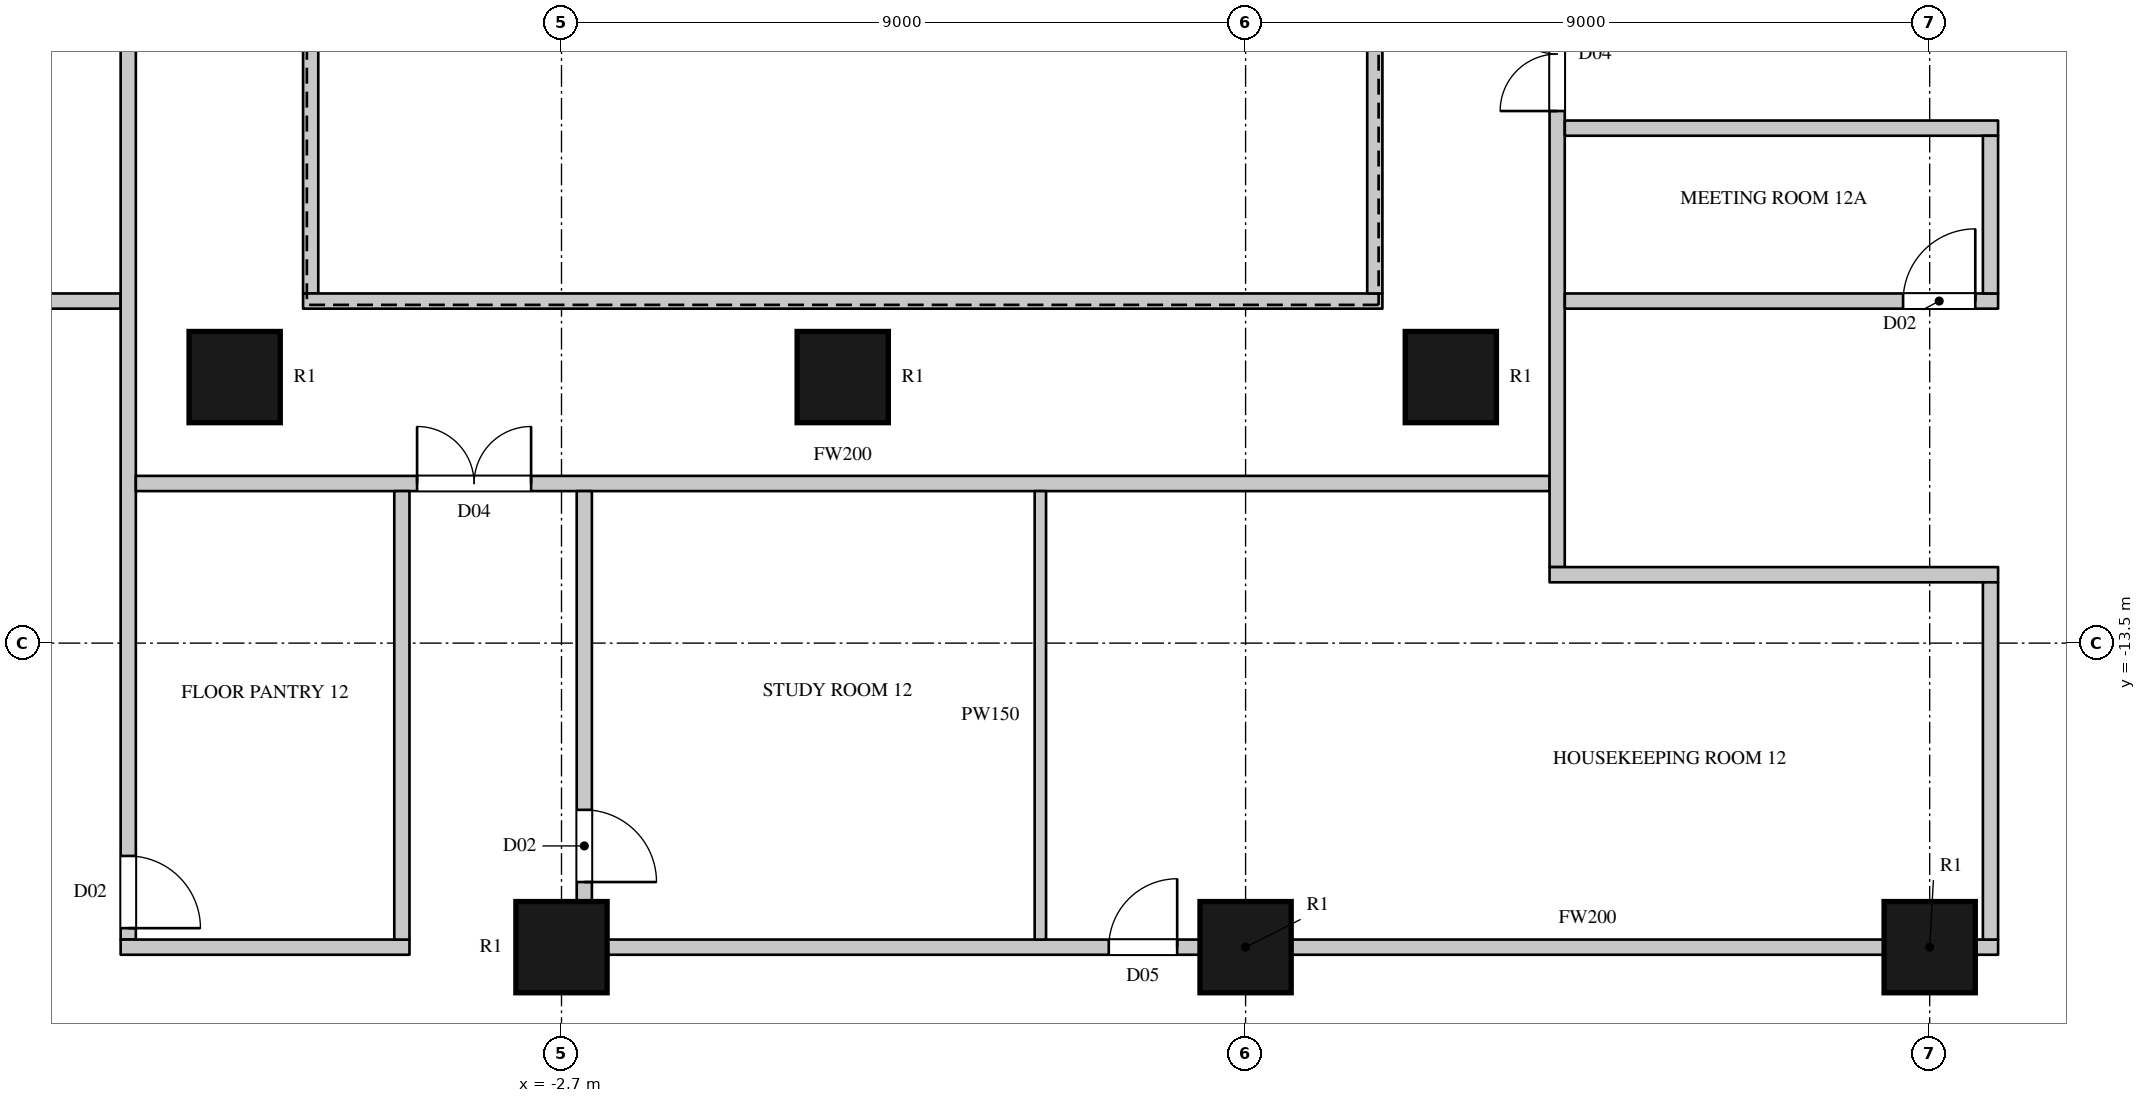
"""IFC4 building model, lengths in metres.
Left out: names, types, materials, properties, quantities, classifications, styles, units other than length and angle.
Written with IfcOpenShell. Run it as: python <this file> out.ifc"""

import sys

from ifc_helpers import new_model, si_unit, direction, frame, frame_2d, origin, origin_2d, place, context, subcontext, project, spatial, rectangle, circle, extrude, element, fill, save


model = new_model("IFC4")
c1 = context("Model", 3, precision=1e-05, world=origin(), true_north=direction((0.0, 1.0)))
c2 = subcontext(c1, "Body", "Model", "MODEL_VIEW")
j1 = project(units=[si_unit("LENGTHUNIT", "METRE"), si_unit("PLANEANGLEUNIT", "RADIAN")], contexts=[c1])
p1 = place(None, origin())
s1 = spatial("IfcSite", under=j1, at=p1, CompositionType="ELEMENT")
p2 = place(p1, origin())
s2 = spatial("IfcBuilding", under=s1, at=p2, CompositionType="ELEMENT")
p3 = place(p2, frame((0.0, 0.0, 73.5)))
s3 = spatial("IfcBuildingStorey", under=s2, at=p3, CompositionType="ELEMENT", Elevation=73.5)
for number, where, z_axis, x_axis in (
    (1, (-2.7, -17.5, 0.0), (0.0, 0.0, 1.0), (1.0, 0.0, 0.0)),
    (2, (6.3, -17.5, 0.0), (0.0, 0.0, 1.0), (1.0, 0.0, 0.0)),
    (3, (15.3, -17.5, 0.0), (0.0, 0.0, 1.0), (1.0, 0.0, 0.0)),
    (4, (-7.0, -10.0, 0.0), (0.0, 0.0, 1.0), (1.0, 0.0, 0.0)),
    (5, (1.0, -10.0, 0.0), (0.0, 0.0, 1.0), (1.0, 0.0, 0.0)),
    (6, (9.0, -10.0, 0.0), (0.0, 0.0, 1.0), (1.0, 0.0, 0.0)),
):
    element("IfcColumn", number, at=place(p3, frame(where, z_axis=z_axis, x_axis=x_axis)), inside=s3, PredefinedType="COLUMN", context=c2, shape_type="SweptSolid", body=[
        extrude(circle(Radius=0.6, at=origin_2d()), origin(), (0.0, 0.0, 1.0), 3.6),
    ])
p4 = place(p3, frame((-13.97, -9.0, 0.0), z_axis=(0.0, 0.0, 1.0), x_axis=(1.0, 0.0, 0.0)))
e7 = element("IfcWall", 7, at=p4, inside=s3, PredefinedType="PARTITIONING", context=c2, shape_type="SweptSolid", body=[
    extrude(rectangle(XDim=5.47, YDim=0.2, at=frame_2d((2.735, 0.0))), origin(), (0.0, 0.0, 1.0), 3.3),
])
p5 = place(p4, frame((0.4, 0.0, 0.0)))
e8 = element("IfcOpeningElement", 8, at=p5, cuts=e7, PredefinedType="OPENING", context=c2, shape_type="SweptSolid", body=[
    extrude(rectangle(XDim=1.5, YDim=2.2, at=frame_2d((0.75, 1.1))), frame((0.0, 0.11, 0.0), z_axis=(0.0, -1.0, 0.0), x_axis=(1.0, 0.0, 0.0)), (0.0, 0.0, 1.0), 0.22),
])
p6 = place(p4, frame((2.05, 0.0, 0.0)))
e9 = element("IfcOpeningElement", 9, at=p6, cuts=e7, PredefinedType="OPENING", context=c2, shape_type="SweptSolid", body=[
    extrude(rectangle(XDim=1.5, YDim=2.2, at=frame_2d((0.75, 1.1))), frame((0.0, 0.11, 0.0), z_axis=(0.0, -1.0, 0.0), x_axis=(1.0, 0.0, 0.0)), (0.0, 0.0, 1.0), 0.22),
])
p7 = place(p3, frame((-8.4, -17.4, 0.0), z_axis=(0.0, 0.0, 1.0), x_axis=(0.0, 1.0, 0.0)))
e10 = element("IfcWall", 10, at=p7, inside=s3, PredefinedType="PARTITIONING", context=c2, shape_type="SweptSolid", body=[
    extrude(rectangle(XDim=34.8, YDim=0.2, at=frame_2d((17.4, 0.0))), origin(), (0.0, 0.0, 1.0), 3.3),
])
p8 = place(p7, frame((21.15, 0.0, 0.0)))
e11 = element("IfcOpeningElement", 11, at=p8, cuts=e10, PredefinedType="OPENING", context=c2, shape_type="SweptSolid", body=[
    extrude(rectangle(XDim=1.5, YDim=2.2, at=frame_2d((0.75, 1.1))), frame((0.0, 0.11, 0.0), z_axis=(0.0, -1.0, 0.0), x_axis=(1.0, 0.0, 0.0)), (0.0, 0.0, 1.0), 0.22),
])
p9 = place(p7, frame((33.75, 0.0, 0.0)))
e12 = element("IfcOpeningElement", 12, at=p9, cuts=e10, PredefinedType="OPENING", context=c2, shape_type="SweptSolid", body=[
    extrude(rectangle(XDim=0.9, YDim=2.2, at=frame_2d((0.45, 1.1))), frame((0.0, 0.11, 0.0), z_axis=(0.0, -1.0, 0.0), x_axis=(1.0, 0.0, 0.0)), (0.0, 0.0, 1.0), 0.22),
])
p10 = place(p7, frame((0.15, 0.0, 0.0)))
e13 = element("IfcOpeningElement", 13, at=p10, cuts=e10, PredefinedType="OPENING", context=c2, shape_type="SweptSolid", body=[
    extrude(rectangle(XDim=0.95, YDim=2.2, at=frame_2d((0.475, 1.1))), frame((0.0, 0.11, 0.0), z_axis=(0.0, -1.0, 0.0), x_axis=(1.0, 0.0, 0.0)), (0.0, 0.0, 1.0), 0.22),
])
p11 = place(p3, frame((-8.5, -17.5, 0.0), z_axis=(0.0, 0.0, 1.0), x_axis=(1.0, 0.0, 0.0)))
e14 = element("IfcWall", 14, at=p11, inside=s3, PredefinedType="PARTITIONING", context=c2, shape_type="SweptSolid", body=[
    extrude(rectangle(XDim=3.8, YDim=0.2, at=frame_2d((1.9, 0.0))), origin(), (0.0, 0.0, 1.0), 2.75),
])
p12 = place(p3, frame((-8.3, -11.4, 0.0), z_axis=(0.0, 0.0, 1.0), x_axis=(1.0, 0.0, 0.0)))
e15 = element("IfcWall", 15, at=p12, inside=s3, PredefinedType="PARTITIONING", context=c2, shape_type="SweptSolid", body=[
    extrude(rectangle(XDim=18.6, YDim=0.2, at=frame_2d((9.3, 0.0))), origin(), (0.0, 0.0, 1.0), 3.3),
])
p13 = place(p12, frame((3.7, 0.0, 0.0)))
e16 = element("IfcOpeningElement", 16, at=p13, cuts=e15, PredefinedType="OPENING", context=c2, shape_type="SweptSolid", body=[
    extrude(rectangle(XDim=1.5, YDim=2.2, at=frame_2d((0.75, 1.1))), frame((0.0, 0.11, 0.0), z_axis=(0.0, -1.0, 0.0), x_axis=(1.0, 0.0, 0.0)), (0.0, 0.0, 1.0), 0.22),
])
p14 = place(p3, frame((-6.0, -8.9, 0.0), z_axis=(0.0, 0.0, 1.0), x_axis=(0.0, 1.0, 0.0)))
e17 = element("IfcWall", 17, at=p14, inside=s3, PredefinedType="PARTITIONING", context=c2, shape_type="SweptSolid", body=[
    extrude(rectangle(XDim=17.8, YDim=0.2, at=frame_2d((8.9, 0.0))), origin(), (0.0, 0.0, 1.0), 3.3),
])
p15 = place(p3, frame((-6.1, -9.0, 0.0), z_axis=(0.0, 0.0, 1.0), x_axis=(1.0, 0.0, 0.0)))
e18 = element("IfcWall", 18, at=p15, inside=s3, PredefinedType="PARTITIONING", context=c2, shape_type="SweptSolid", body=[
    extrude(rectangle(XDim=14.2, YDim=0.2, at=frame_2d((7.1, 0.0))), origin(), (0.0, 0.0, 1.0), 3.3),
])
p16 = place(p3, frame((-4.8, -17.4, 0.0), z_axis=(0.0, 0.0, 1.0), x_axis=(0.0, 1.0, 0.0)))
e19 = element("IfcWall", 19, at=p16, inside=s3, PredefinedType="PARTITIONING", context=c2, shape_type="SweptSolid", body=[
    extrude(rectangle(XDim=5.9, YDim=0.2, at=frame_2d((2.95, 0.0))), origin(), (0.0, 0.0, 1.0), 3.3),
])
p17 = place(p3, frame((-2.4, -16.943, 0.0), z_axis=(0.0, 0.0, 1.0), x_axis=(0.0, 1.0, 0.0)))
e20 = element("IfcWall", 20, at=p17, inside=s3, PredefinedType="PARTITIONING", context=c2, shape_type="SweptSolid", body=[
    extrude(rectangle(XDim=5.443, YDim=0.2, at=frame_2d((2.722, 0.0))), origin(), (0.0, 0.0, 1.0), 3.3),
])
p18 = place(p17, frame((0.3, 0.0, 0.0)))
e21 = element("IfcOpeningElement", 21, at=p18, cuts=e20, PredefinedType="OPENING", context=c2, shape_type="SweptSolid", body=[
    extrude(rectangle(XDim=0.95, YDim=2.2, at=frame_2d((0.475, 1.1))), frame((0.0, 0.11, 0.0), z_axis=(0.0, -1.0, 0.0), x_axis=(1.0, 0.0, 0.0)), (0.0, 0.0, 1.0), 0.22),
])
p19 = place(p3, frame((-2.1, -17.5, 0.0), z_axis=(0.0, 0.0, 1.0), x_axis=(1.0, 0.0, 0.0)))
e22 = element("IfcWall", 22, at=p19, inside=s3, PredefinedType="PARTITIONING", context=c2, shape_type="SweptSolid", body=[
    extrude(rectangle(XDim=7.8, YDim=0.2, at=frame_2d((3.9, 0.0))), origin(), (0.0, 0.0, 1.0), 2.75),
])
p20 = place(p19, frame((6.6, 0.0, 0.0)))
e23 = element("IfcOpeningElement", 23, at=p20, cuts=e22, PredefinedType="OPENING", context=c2, shape_type="SweptSolid", body=[
    extrude(rectangle(XDim=0.9, YDim=2.2, at=frame_2d((0.45, 1.1))), frame((0.0, 0.11, 0.0), z_axis=(0.0, -1.0, 0.0), x_axis=(1.0, 0.0, 0.0)), (0.0, 0.0, 1.0), 0.22),
])
p21 = place(p3, frame((6.9, -17.5, 0.0), z_axis=(0.0, 0.0, 1.0), x_axis=(1.0, 0.0, 0.0)))
e24 = element("IfcWall", 24, at=p21, inside=s3, PredefinedType="PARTITIONING", context=c2, shape_type="SweptSolid", body=[
    extrude(rectangle(XDim=7.8, YDim=0.2, at=frame_2d((3.9, 0.0))), origin(), (0.0, 0.0, 1.0), 2.75),
])
p22 = place(p3, frame((15.9, -17.5, 0.0), z_axis=(0.0, 0.0, 1.0), x_axis=(1.0, 0.0, 0.0)))
e25 = element("IfcWall", 25, at=p22, inside=s3, PredefinedType="PARTITIONING", context=c2, shape_type="SweptSolid", body=[
    extrude(rectangle(XDim=0.3, YDim=0.2, at=frame_2d((0.15, 0.0))), origin(), (0.0, 0.0, 1.0), 3.3),
])
p23 = place(p3, frame((8.0, -8.9, 0.0), z_axis=(0.0, 0.0, 1.0), x_axis=(0.0, 1.0, 0.0)))
e26 = element("IfcWall", 26, at=p23, inside=s3, PredefinedType="PARTITIONING", context=c2, shape_type="SweptSolid", body=[
    extrude(rectangle(XDim=17.8, YDim=0.2, at=frame_2d((8.9, 0.0))), origin(), (0.0, 0.0, 1.0), 3.3),
])
p24 = place(p3, frame((10.399, -12.5, 0.0), z_axis=(0.0, 0.0, 1.0), x_axis=(0.0, 1.0, 0.0)))
e27 = element("IfcWall", 27, at=p24, inside=s3, PredefinedType="PARTITIONING", context=c2, shape_type="SweptSolid", body=[
    extrude(rectangle(XDim=23.8, YDim=0.2, at=frame_2d((11.9, 0.0))), origin(), (0.0, 0.0, 1.0), 3.3),
])
p25 = place(p24, frame((6.0, 0.0, 0.0)))
e28 = element("IfcOpeningElement", 28, at=p25, cuts=e27, PredefinedType="OPENING", context=c2, shape_type="SweptSolid", body=[
    extrude(rectangle(XDim=1.5, YDim=2.2, at=frame_2d((0.75, 1.1))), frame((0.0, 0.11, 0.0), z_axis=(0.0, -1.0, 0.0), x_axis=(1.0, 0.0, 0.0)), (0.0, 0.0, 1.0), 0.22),
])
p26 = place(p24, frame((17.5, 0.0, 0.0)))
e29 = element("IfcOpeningElement", 29, at=p26, cuts=e27, PredefinedType="OPENING", context=c2, shape_type="SweptSolid", body=[
    extrude(rectangle(XDim=1.5, YDim=2.2, at=frame_2d((0.75, 1.1))), frame((0.0, 0.11, 0.0), z_axis=(0.0, -1.0, 0.0), x_axis=(1.0, 0.0, 0.0)), (0.0, 0.0, 1.0), 0.22),
])
p27 = place(p24, frame((7.7, 0.0, 0.0)))
e30 = element("IfcOpeningElement", 30, at=p27, cuts=e27, PredefinedType="OPENING", context=c2, shape_type="SweptSolid", body=[
    extrude(rectangle(XDim=1.5, YDim=2.2, at=frame_2d((0.75, 1.1))), frame((0.0, 0.11, 0.0), z_axis=(0.0, -1.0, 0.0), x_axis=(1.0, 0.0, 0.0)), (0.0, 0.0, 1.0), 0.22),
])
p28 = place(p24, frame((13.15, 0.0, 0.0)))
e31 = element("IfcOpeningElement", 31, at=p28, cuts=e27, PredefinedType="OPENING", context=c2, shape_type="SweptSolid", body=[
    extrude(rectangle(XDim=1.5, YDim=2.2, at=frame_2d((0.75, 1.1))), frame((0.0, 0.11, 0.0), z_axis=(0.0, -1.0, 0.0), x_axis=(1.0, 0.0, 0.0)), (0.0, 0.0, 1.0), 0.22),
])
p29 = place(p3, frame((10.299, -12.6, 0.0), z_axis=(0.0, 0.0, 1.0), x_axis=(1.0, 0.0, 0.0)))
e32 = element("IfcWall", 32, at=p29, inside=s3, PredefinedType="PARTITIONING", context=c2, shape_type="SweptSolid", body=[
    extrude(rectangle(XDim=5.901, YDim=0.2, at=frame_2d((2.95, 0.0))), origin(), (0.0, 0.0, 1.0), 3.3),
])
p30 = place(p3, frame((10.5, -9.0, 0.0), z_axis=(0.0, 0.0, 1.0), x_axis=(1.0, 0.0, 0.0)))
e33 = element("IfcWall", 33, at=p30, inside=s3, PredefinedType="PARTITIONING", context=c2, shape_type="SweptSolid", body=[
    extrude(rectangle(XDim=5.7, YDim=0.2, at=frame_2d((2.85, 0.0))), origin(), (0.0, 0.0, 1.0), 2.65),
])
p31 = place(p30, frame((4.45, 0.0, 0.0)))
e34 = element("IfcOpeningElement", 34, at=p31, cuts=e33, PredefinedType="OPENING", context=c2, shape_type="SweptSolid", body=[
    extrude(rectangle(XDim=0.95, YDim=2.2, at=frame_2d((0.475, 1.1))), frame((0.0, 0.11, 0.0), z_axis=(0.0, -1.0, 0.0), x_axis=(1.0, 0.0, 0.0)), (0.0, 0.0, 1.0), 0.22),
])
p32 = place(p3, frame((10.5, -6.725, 0.0), z_axis=(0.0, 0.0, 1.0), x_axis=(1.0, 0.0, 0.0)))
e35 = element("IfcWall", 35, at=p32, inside=s3, PredefinedType="PARTITIONING", context=c2, shape_type="SweptSolid", body=[
    extrude(rectangle(XDim=5.7, YDim=0.2, at=frame_2d((2.85, 0.0))), origin(), (0.0, 0.0, 1.0), 3.3),
])
p33 = place(p3, frame((16.1, -17.4, 0.0), z_axis=(0.0, 0.0, 1.0), x_axis=(0.0, 1.0, 0.0)))
e36 = element("IfcWall", 36, at=p33, inside=s3, PredefinedType="PARTITIONING", context=c2, shape_type="SweptSolid", body=[
    extrude(rectangle(XDim=4.7, YDim=0.2, at=frame_2d((2.35, 0.0))), origin(), (0.0, 0.0, 1.0), 3.3),
])
p34 = place(p3, frame((16.1, -8.9, 0.0), z_axis=(0.0, 0.0, 1.0), x_axis=(0.0, 1.0, 0.0)))
e37 = element("IfcWall", 37, at=p34, inside=s3, PredefinedType="PARTITIONING", context=c2, shape_type="SweptSolid", body=[
    extrude(rectangle(XDim=2.075, YDim=0.2, at=frame_2d((1.038, 0.0))), origin(), (0.0, 0.0, 1.0), 3.3),
])
p35 = place(p3, frame((3.6, -17.4, 0.0), z_axis=(0.0, 0.0, 1.0), x_axis=(0.0, 1.0, 0.0)))
e38 = element("IfcWall", 38, at=p35, inside=s3, PredefinedType="PARTITIONING", context=c2, shape_type="SweptSolid", body=[
    extrude(rectangle(XDim=5.9, YDim=0.15, at=frame_2d((2.95, 0.0))), origin(), (0.0, 0.0, 1.0), 3.3),
])
p36 = place(p13, origin())
e39 = element("IfcDoor", 39, at=p36, inside=s3, OperationType="DOUBLE_DOOR_SINGLE_SWING", PredefinedType="DOOR", context=c2, shape_type="SweptSolid", body=[
    extrude(rectangle(XDim=1.5, YDim=2.2, at=frame_2d((0.75, 1.1))), frame((0.0, 0.025, 0.0), z_axis=(0.0, -1.0, 0.0), x_axis=(1.0, 0.0, 0.0)), (0.0, 0.0, 1.0), 0.05),
])
fill(e16, e39)
p37 = place(p25, origin())
e40 = element("IfcDoor", 40, at=p37, inside=s3, OperationType="DOUBLE_DOOR_SINGLE_SWING", PredefinedType="DOOR", context=c2, shape_type="SweptSolid", body=[
    extrude(rectangle(XDim=1.5, YDim=2.2, at=frame_2d((0.75, 1.1))), frame((0.0, 0.025, 0.0), z_axis=(0.0, -1.0, 0.0), x_axis=(1.0, 0.0, 0.0)), (0.0, 0.0, 1.0), 0.05),
])
fill(e28, e40)
p38 = place(p10, origin())
e41 = element("IfcDoor", 41, at=p38, inside=s3, OperationType="SINGLE_SWING_RIGHT", PredefinedType="DOOR", context=c2, shape_type="SweptSolid", body=[
    extrude(rectangle(XDim=0.95, YDim=2.2, at=frame_2d((0.475, 1.1))), frame((0.0, 0.025, 0.0), z_axis=(0.0, -1.0, 0.0), x_axis=(1.0, 0.0, 0.0)), (0.0, 0.0, 1.0), 0.05),
])
fill(e13, e41)
p39 = place(p18, origin())
e42 = element("IfcDoor", 42, at=p39, inside=s3, OperationType="SINGLE_SWING_RIGHT", PredefinedType="DOOR", context=c2, shape_type="SweptSolid", body=[
    extrude(rectangle(XDim=0.95, YDim=2.2, at=frame_2d((0.475, 1.1))), frame((0.0, 0.025, 0.0), z_axis=(0.0, -1.0, 0.0), x_axis=(1.0, 0.0, 0.0)), (0.0, 0.0, 1.0), 0.05),
])
fill(e21, e42)
p40 = place(p20, origin())
e43 = element("IfcDoor", 43, at=p40, inside=s3, OperationType="SINGLE_SWING_RIGHT", PredefinedType="DOOR", context=c2, shape_type="SweptSolid", body=[
    extrude(rectangle(XDim=0.9, YDim=2.2, at=frame_2d((0.45, 1.1))), frame((0.0, 0.025, 0.0), z_axis=(0.0, -1.0, 0.0), x_axis=(1.0, 0.0, 0.0)), (0.0, 0.0, 1.0), 0.05),
])
fill(e23, e43)
p41 = place(p31, origin())
e44 = element("IfcDoor", 44, at=p41, inside=s3, OperationType="SINGLE_SWING_RIGHT", PredefinedType="DOOR", context=c2, shape_type="SweptSolid", body=[
    extrude(rectangle(XDim=0.95, YDim=2.2, at=frame_2d((0.475, 1.1))), frame((0.0, 0.025, 0.0), z_axis=(0.0, -1.0, 0.0), x_axis=(1.0, 0.0, 0.0)), (0.0, 0.0, 1.0), 0.05),
])
fill(e34, e44)
save(model, sys.argv[1])
